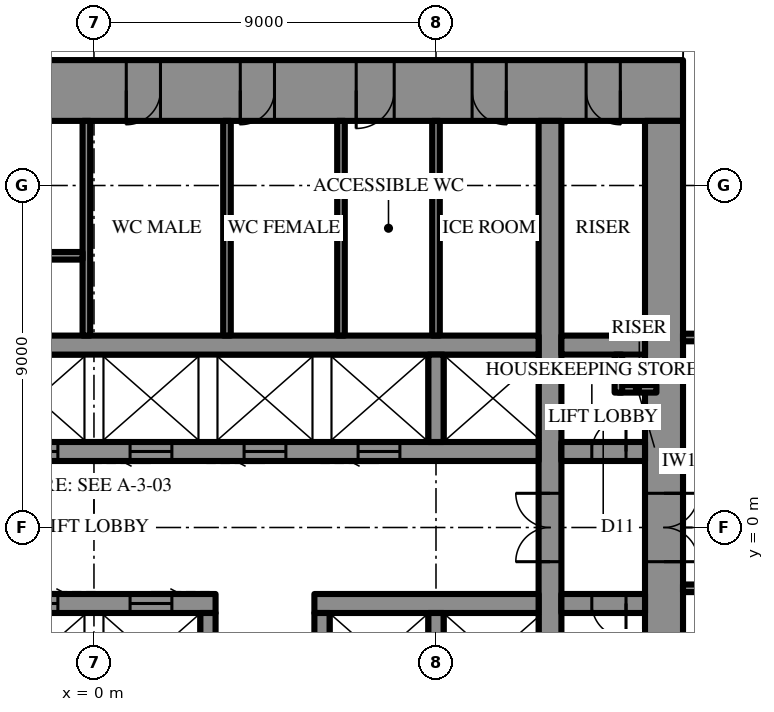
"""IFC4 building model, lengths in metres.
Left out: names, types, materials, properties, quantities, classifications, styles, units other than length and angle.
Written with IfcOpenShell. Run it as: python <this file> out.ifc"""

import sys

from ifc_helpers import new_model, si_unit, direction, frame, frame_2d, origin, place, context, subcontext, project, spatial, rectangle, extrude, element, fill, save


model = new_model("IFC4")
c1 = context("Model", 3, precision=1e-05, world=origin(), true_north=direction((0.0, 1.0)))
c2 = subcontext(c1, "Body", "Model", "MODEL_VIEW")
j1 = project(units=[si_unit("LENGTHUNIT", "METRE"), si_unit("PLANEANGLEUNIT", "RADIAN")], contexts=[c1])
p1 = place(None, origin())
s1 = spatial("IfcSite", under=j1, at=p1, CompositionType="ELEMENT")
p2 = place(p1, origin())
s2 = spatial("IfcBuilding", under=s1, at=p2, CompositionType="ELEMENT")
p3 = place(p2, frame((0.0, 0.0, 270.1)))
s3 = spatial("IfcBuildingStorey", under=s2, at=p3, CompositionType="ELEMENT", Elevation=270.1)
p4 = place(p3, frame((-15.5, 11.5, 0.0), z_axis=(0.0, 0.0, 1.0), x_axis=(1.0, 0.0, 0.0)))
e1 = element("IfcWall", 1, at=p4, inside=s3, PredefinedType="SHEAR", context=c2, shape_type="SweptSolid", body=[
    extrude(rectangle(XDim=31.0, YDim=1.6, at=frame_2d((15.5, 0.0))), origin(), (0.0, 0.0, 1.0), 4.2),
])
p5 = place(p4, frame((16.35, 0.0, 0.0)))
e2 = element("IfcOpeningElement", 2, at=p5, cuts=e1, PredefinedType="OPENING", context=c2, shape_type="SweptSolid", body=[
    extrude(rectangle(XDim=0.9, YDim=2.2, at=frame_2d((0.45, 1.1))), frame((0.0, 0.81, 0.0), z_axis=(0.0, -1.0, 0.0), x_axis=(1.0, 0.0, 0.0)), (0.0, 0.0, 1.0), 1.62),
])
p6 = place(p4, frame((19.35, 0.0, 0.0)))
e3 = element("IfcOpeningElement", 3, at=p6, cuts=e1, PredefinedType="OPENING", context=c2, shape_type="SweptSolid", body=[
    extrude(rectangle(XDim=0.9, YDim=2.2, at=frame_2d((0.45, 1.1))), frame((0.0, 0.81, 0.0), z_axis=(0.0, -1.0, 0.0), x_axis=(1.0, 0.0, 0.0)), (0.0, 0.0, 1.0), 1.62),
])
p7 = place(p4, frame((22.4, 0.0, 0.0)))
e4 = element("IfcOpeningElement", 4, at=p7, cuts=e1, PredefinedType="OPENING", context=c2, shape_type="SweptSolid", body=[
    extrude(rectangle(XDim=1.0, YDim=2.2, at=frame_2d((0.5, 1.1))), frame((0.0, 0.81, 0.0), z_axis=(0.0, -1.0, 0.0), x_axis=(1.0, 0.0, 0.0)), (0.0, 0.0, 1.0), 1.62),
])
p8 = place(p4, frame((1.65, 0.0, 0.0)))
e5 = element("IfcOpeningElement", 5, at=p8, cuts=e1, PredefinedType="OPENING", context=c2, shape_type="SweptSolid", body=[
    extrude(rectangle(XDim=0.9, YDim=2.2, at=frame_2d((0.45, 1.1))), frame((0.0, 0.81, 0.0), z_axis=(0.0, -1.0, 0.0), x_axis=(1.0, 0.0, 0.0)), (0.0, 0.0, 1.0), 1.62),
])
p9 = place(p4, frame((4.65, 0.0, 0.0)))
e6 = element("IfcOpeningElement", 6, at=p9, cuts=e1, PredefinedType="OPENING", context=c2, shape_type="SweptSolid", body=[
    extrude(rectangle(XDim=0.9, YDim=2.2, at=frame_2d((0.45, 1.1))), frame((0.0, 0.81, 0.0), z_axis=(0.0, -1.0, 0.0), x_axis=(1.0, 0.0, 0.0)), (0.0, 0.0, 1.0), 1.62),
])
p10 = place(p4, frame((25.45, 0.0, 0.0)))
e7 = element("IfcOpeningElement", 7, at=p10, cuts=e1, PredefinedType="OPENING", context=c2, shape_type="SweptSolid", body=[
    extrude(rectangle(XDim=0.9, YDim=2.2, at=frame_2d((0.45, 1.1))), frame((0.0, 0.81, 0.0), z_axis=(0.0, -1.0, 0.0), x_axis=(1.0, 0.0, 0.0)), (0.0, 0.0, 1.0), 1.62),
])
p11 = place(p4, frame((28.45, 0.0, 0.0)))
e8 = element("IfcOpeningElement", 8, at=p11, cuts=e1, PredefinedType="OPENING", context=c2, shape_type="SweptSolid", body=[
    extrude(rectangle(XDim=0.9, YDim=2.2, at=frame_2d((0.45, 1.1))), frame((0.0, 0.81, 0.0), z_axis=(0.0, -1.0, 0.0), x_axis=(1.0, 0.0, 0.0)), (0.0, 0.0, 1.0), 1.62),
])
p12 = place(p3, frame((15.0, -10.7, 0.0), z_axis=(0.0, 0.0, 1.0), x_axis=(0.0, 1.0, 0.0)))
e9 = element("IfcWall", 9, at=p12, inside=s3, PredefinedType="SHEAR", context=c2, shape_type="SweptSolid", body=[
    extrude(rectangle(XDim=21.4, YDim=1.0, at=frame_2d((10.7, 0.0))), origin(), (0.0, 0.0, 1.0), 4.2),
])
p13 = place(p12, frame((9.8, 0.0, 0.0)))
e10 = element("IfcOpeningElement", 10, at=p13, cuts=e9, PredefinedType="OPENING", context=c2, shape_type="SweptSolid", body=[
    extrude(rectangle(XDim=1.8, YDim=2.4, at=frame_2d((0.9, 1.2))), frame((0.0, 0.51, 0.0), z_axis=(0.0, -1.0, 0.0), x_axis=(1.0, 0.0, 0.0)), (0.0, 0.0, 1.0), 1.02),
])
p14 = place(p3, frame((12.0, -10.7, 0.0), z_axis=(0.0, 0.0, 1.0), x_axis=(0.0, 1.0, 0.0)))
e11 = element("IfcWall", 11, at=p14, inside=s3, PredefinedType="SHEAR", context=c2, shape_type="SweptSolid", body=[
    extrude(rectangle(XDim=21.4, YDim=0.6, at=frame_2d((10.7, 0.0))), origin(), (0.0, 0.0, 1.0), 4.2),
])
p15 = place(p14, frame((9.8, 0.0, 0.0)))
e12 = element("IfcOpeningElement", 12, at=p15, cuts=e11, PredefinedType="OPENING", context=c2, shape_type="SweptSolid", body=[
    extrude(rectangle(XDim=1.8, YDim=2.4, at=frame_2d((0.9, 1.2))), frame((0.0, 0.31, 0.0), z_axis=(0.0, -1.0, 0.0), x_axis=(1.0, 0.0, 0.0)), (0.0, 0.0, 1.0), 0.62),
])
p16 = place(p3, frame((-3.2, 2.0, 0.0), z_axis=(0.0, 0.0, 1.0), x_axis=(1.0, 0.0, 0.0)))
e13 = element("IfcWall", 13, at=p16, inside=s3, PredefinedType="SHEAR", context=c2, shape_type="SweptSolid", body=[
    extrude(rectangle(XDim=14.9, YDim=0.5, at=frame_2d((7.45, 0.0))), origin(), (0.0, 0.0, 1.0), 4.2),
])
p17 = place(p16, frame((1.15, 0.0, 0.0)))
e14 = element("IfcOpeningElement", 14, at=p17, cuts=e13, PredefinedType="OPENING", context=c2, shape_type="SweptSolid", body=[
    extrude(rectangle(XDim=1.1, YDim=2.2, at=frame_2d((0.55, 1.1))), frame((0.0, 0.26, 0.0), z_axis=(0.0, -1.0, 0.0), x_axis=(1.0, 0.0, 0.0)), (0.0, 0.0, 1.0), 0.52),
])
p18 = place(p16, frame((4.15, 0.0, 0.0)))
e15 = element("IfcOpeningElement", 15, at=p18, cuts=e13, PredefinedType="OPENING", context=c2, shape_type="SweptSolid", body=[
    extrude(rectangle(XDim=1.1, YDim=2.2, at=frame_2d((0.55, 1.1))), frame((0.0, 0.26, 0.0), z_axis=(0.0, -1.0, 0.0), x_axis=(1.0, 0.0, 0.0)), (0.0, 0.0, 1.0), 0.52),
])
p19 = place(p16, frame((7.15, 0.0, 0.0)))
e16 = element("IfcOpeningElement", 16, at=p19, cuts=e13, PredefinedType="OPENING", context=c2, shape_type="SweptSolid", body=[
    extrude(rectangle(XDim=1.1, YDim=2.2, at=frame_2d((0.55, 1.1))), frame((0.0, 0.26, 0.0), z_axis=(0.0, -1.0, 0.0), x_axis=(1.0, 0.0, 0.0)), (0.0, 0.0, 1.0), 0.52),
])
p20 = place(p16, frame((10.15, 0.0, 0.0)))
e17 = element("IfcOpeningElement", 17, at=p20, cuts=e13, PredefinedType="OPENING", context=c2, shape_type="SweptSolid", body=[
    extrude(rectangle(XDim=1.1, YDim=2.2, at=frame_2d((0.55, 1.1))), frame((0.0, 0.26, 0.0), z_axis=(0.0, -1.0, 0.0), x_axis=(1.0, 0.0, 0.0)), (0.0, 0.0, 1.0), 0.52),
])
p21 = place(p3, frame((12.3, 2.0, 0.0), z_axis=(0.0, 0.0, 1.0), x_axis=(1.0, 0.0, 0.0)))
e18 = element("IfcWall", 18, at=p21, inside=s3, PredefinedType="SHEAR", context=c2, shape_type="SweptSolid", body=[
    extrude(rectangle(XDim=2.2, YDim=0.5, at=frame_2d((1.1, 0.0))), origin(), (0.0, 0.0, 1.0), 4.2),
])
p22 = place(p21, frame((0.8, 0.0, 0.0)))
e19 = element("IfcOpeningElement", 19, at=p22, cuts=e18, PredefinedType="OPENING", context=c2, shape_type="SweptSolid", body=[
    extrude(rectangle(XDim=0.9, YDim=2.2, at=frame_2d((0.45, 1.1))), frame((0.0, 0.26, 0.0), z_axis=(0.0, -1.0, 0.0), x_axis=(1.0, 0.0, 0.0)), (0.0, 0.0, 1.0), 0.52),
])
p23 = place(p3, frame((-11.7, 4.8, 0.0), z_axis=(0.0, 0.0, 1.0), x_axis=(1.0, 0.0, 0.0)))
e20 = element("IfcWall", 20, at=p23, inside=s3, PredefinedType="SHEAR", context=c2, shape_type="SweptSolid", body=[
    extrude(rectangle(XDim=23.4, YDim=0.5, at=frame_2d((11.7, 0.0))), origin(), (0.0, 0.0, 1.0), 4.2),
])
p24 = place(p23, frame((6.6, 0.0, 0.0)))
e21 = element("IfcOpeningElement", 21, at=p24, cuts=e20, PredefinedType="OPENING", context=c2, shape_type="SweptSolid", body=[
    extrude(rectangle(XDim=1.2, YDim=2.2, at=frame_2d((0.6, 1.1))), frame((0.0, 0.26, 0.0), z_axis=(0.0, -1.0, 0.0), x_axis=(1.0, 0.0, 0.0)), (0.0, 0.0, 1.0), 0.52),
])
p25 = place(p23, frame((3.6, 0.0, 0.0)))
e22 = element("IfcOpeningElement", 22, at=p25, cuts=e20, PredefinedType="OPENING", context=c2, shape_type="SweptSolid", body=[
    extrude(rectangle(XDim=1.2, YDim=2.2, at=frame_2d((0.6, 1.1))), frame((0.0, 0.26, 0.0), z_axis=(0.0, -1.0, 0.0), x_axis=(1.0, 0.0, 0.0)), (0.0, 0.0, 1.0), 0.52),
])
p26 = place(p3, frame((12.3, 4.8, 0.0), z_axis=(0.0, 0.0, 1.0), x_axis=(1.0, 0.0, 0.0)))
e23 = element("IfcWall", 23, at=p26, inside=s3, PredefinedType="SHEAR", context=c2, shape_type="SweptSolid", body=[
    extrude(rectangle(XDim=2.2, YDim=0.5, at=frame_2d((1.1, 0.0))), origin(), (0.0, 0.0, 1.0), 4.2),
])
p27 = place(p3, frame((9.0, 2.25, 0.0), z_axis=(0.0, 0.0, 1.0), x_axis=(0.0, 1.0, 0.0)))
e24 = element("IfcWall", 24, at=p27, inside=s3, PredefinedType="SHEAR", context=c2, shape_type="SweptSolid", body=[
    extrude(rectangle(XDim=2.3, YDim=0.4, at=frame_2d((1.15, 0.0))), origin(), (0.0, 0.0, 1.0), 4.2),
])
p28 = place(p3, frame((-0.2, 5.05, 0.0), z_axis=(0.0, 0.0, 1.0), x_axis=(0.0, 1.0, 0.0)))
e25 = element("IfcWall", 25, at=p28, inside=s3, PredefinedType="SHEAR", context=c2, shape_type="SweptSolid", body=[
    extrude(rectangle(XDim=5.65, YDim=0.2, at=frame_2d((2.825, 0.0))), origin(), (0.0, 0.0, 1.0), 4.2),
])
p29 = place(p3, frame((-8.9, 7.15, 0.0), z_axis=(0.0, 0.0, 1.0), x_axis=(1.0, 0.0, 0.0)))
e26 = element("IfcWall", 26, at=p29, inside=s3, PredefinedType="SHEAR", context=c2, shape_type="SweptSolid", body=[
    extrude(rectangle(XDim=8.6, YDim=0.2, at=frame_2d((4.3, 0.0))), origin(), (0.0, 0.0, 1.0), 4.2),
])
p30 = place(p29, frame((0.3, 0.0, 0.0)))
e27 = element("IfcOpeningElement", 27, at=p30, cuts=e26, PredefinedType="OPENING", context=c2, shape_type="SweptSolid", body=[
    extrude(rectangle(XDim=1.0, YDim=2.2, at=frame_2d((0.5, 1.1))), frame((0.0, 0.11, 0.0), z_axis=(0.0, -1.0, 0.0), x_axis=(1.0, 0.0, 0.0)), (0.0, 0.0, 1.0), 0.22),
])
p31 = place(p3, frame((14.5, -2.0, 0.0), z_axis=(0.0, 0.0, 1.0), x_axis=(-1.0, 0.0, 0.0)))
e28 = element("IfcWall", 28, at=p31, inside=s3, PredefinedType="SHEAR", context=c2, shape_type="SweptSolid", body=[
    extrude(rectangle(XDim=2.2, YDim=0.5, at=frame_2d((1.1, 0.0))), origin(), (0.0, 0.0, 1.0), 4.2),
])
p32 = place(p31, frame((0.5, 0.0, 0.0)))
e29 = element("IfcOpeningElement", 29, at=p32, cuts=e28, PredefinedType="OPENING", context=c2, shape_type="SweptSolid", body=[
    extrude(rectangle(XDim=0.9, YDim=2.2, at=frame_2d((0.45, 1.1))), frame((0.0, 0.26, 0.0), z_axis=(0.0, -1.0, 0.0), x_axis=(1.0, 0.0, 0.0)), (0.0, 0.0, 1.0), 0.52),
])
p33 = place(p3, frame((11.7, -2.0, 0.0), z_axis=(0.0, 0.0, 1.0), x_axis=(-1.0, 0.0, 0.0)))
e30 = element("IfcWall", 30, at=p33, inside=s3, PredefinedType="SHEAR", context=c2, shape_type="SweptSolid", body=[
    extrude(rectangle(XDim=5.9, YDim=0.5, at=frame_2d((2.95, 0.0))), origin(), (0.0, 0.0, 1.0), 4.2),
])
p34 = place(p3, frame((3.2, -2.0, 0.0), z_axis=(0.0, 0.0, 1.0), x_axis=(-1.0, 0.0, 0.0)))
e31 = element("IfcWall", 31, at=p34, inside=s3, PredefinedType="SHEAR", context=c2, shape_type="SweptSolid", body=[
    extrude(rectangle(XDim=14.9, YDim=0.5, at=frame_2d((7.45, 0.0))), origin(), (0.0, 0.0, 1.0), 4.2),
])
p35 = place(p34, frame((1.15, 0.0, 0.0)))
e32 = element("IfcOpeningElement", 32, at=p35, cuts=e31, PredefinedType="OPENING", context=c2, shape_type="SweptSolid", body=[
    extrude(rectangle(XDim=1.1, YDim=2.2, at=frame_2d((0.55, 1.1))), frame((0.0, 0.26, 0.0), z_axis=(0.0, -1.0, 0.0), x_axis=(1.0, 0.0, 0.0)), (0.0, 0.0, 1.0), 0.52),
])
p36 = place(p34, frame((4.15, 0.0, 0.0)))
e33 = element("IfcOpeningElement", 33, at=p36, cuts=e31, PredefinedType="OPENING", context=c2, shape_type="SweptSolid", body=[
    extrude(rectangle(XDim=1.1, YDim=2.2, at=frame_2d((0.55, 1.1))), frame((0.0, 0.26, 0.0), z_axis=(0.0, -1.0, 0.0), x_axis=(1.0, 0.0, 0.0)), (0.0, 0.0, 1.0), 0.52),
])
p37 = place(p34, frame((7.15, 0.0, 0.0)))
e34 = element("IfcOpeningElement", 34, at=p37, cuts=e31, PredefinedType="OPENING", context=c2, shape_type="SweptSolid", body=[
    extrude(rectangle(XDim=1.1, YDim=2.2, at=frame_2d((0.55, 1.1))), frame((0.0, 0.26, 0.0), z_axis=(0.0, -1.0, 0.0), x_axis=(1.0, 0.0, 0.0)), (0.0, 0.0, 1.0), 0.52),
])
p38 = place(p34, frame((10.15, 0.0, 0.0)))
e35 = element("IfcOpeningElement", 35, at=p38, cuts=e31, PredefinedType="OPENING", context=c2, shape_type="SweptSolid", body=[
    extrude(rectangle(XDim=1.1, YDim=2.2, at=frame_2d((0.55, 1.1))), frame((0.0, 0.26, 0.0), z_axis=(0.0, -1.0, 0.0), x_axis=(1.0, 0.0, 0.0)), (0.0, 0.0, 1.0), 0.52),
])
for number, where, z_axis, x_axis in (
    (36, (9.0, -2.25, 0.0), (0.0, 0.0, 1.0), (0.0, -1.0, 0.0)),
    (37, (6.0, -2.25, 0.0), (0.0, 0.0, 1.0), (0.0, -1.0, 0.0)),
    (38, (3.0, -2.25, 0.0), (0.0, 0.0, 1.0), (0.0, -1.0, 0.0)),
):
    element("IfcWall", number, at=place(p3, frame(where, z_axis=z_axis, x_axis=x_axis)), inside=s3, PredefinedType="SHEAR", context=c2, shape_type="SweptSolid", body=[
        extrude(rectangle(XDim=2.3, YDim=0.4, at=frame_2d((1.15, 0.0))), origin(), (0.0, 0.0, 1.0), 4.2),
    ])
for number, where, z_axis, x_axis in (
    (39, (9.0, 5.05, 0.0), (0.0, 0.0, 1.0), (0.0, 1.0, 0.0)),
    (40, (3.5, 5.05, 0.0), (0.0, 0.0, 1.0), (0.0, 1.0, 0.0)),
    (41, (6.5, 5.05, 0.0), (0.0, 0.0, 1.0), (0.0, 1.0, 0.0)),
):
    element("IfcWall", number, at=place(p3, frame(where, z_axis=z_axis, x_axis=x_axis)), inside=s3, PredefinedType="PARTITIONING", context=c2, shape_type="SweptSolid", body=[
        extrude(rectangle(XDim=5.65, YDim=0.2, at=frame_2d((2.825, 0.0))), origin(), (0.0, 0.0, 1.0), 4.0),
    ])
for number, where, z_axis, x_axis in (
    (42, (13.8, 3.65, 0.0), (0.0, 0.0, 1.0), (1.0, 0.0, 0.0)),
    (43, (13.8, 3.55, 0.0), (0.0, 0.0, 1.0), (0.0, 1.0, 0.0)),
):
    element("IfcWall", number, at=place(p3, frame(where, z_axis=z_axis, x_axis=x_axis)), inside=s3, PredefinedType="PARTITIONING", context=c2, shape_type="SweptSolid", body=[
        extrude(rectangle(XDim=1.0, YDim=0.2, at=frame_2d((0.5, 0.0))), origin(), (0.0, 0.0, 1.0), 4.0),
    ])
p39 = place(p3, frame((15.5, 1.6, 0.0), z_axis=(0.0, 0.0, 1.0), x_axis=(1.0, 0.0, 0.0)))
e44 = element("IfcWall", 44, at=p39, inside=s3, PredefinedType="PARTITIONING", context=c2, shape_type="SweptSolid", body=[
    extrude(rectangle(XDim=10.7, YDim=0.2, at=frame_2d((5.35, 0.0))), origin(), (0.0, 0.0, 1.0), 4.0),
])
p40 = place(p39, frame((2.71, 0.0, 0.0)))
e45 = element("IfcOpeningElement", 45, at=p40, cuts=e44, PredefinedType="OPENING", context=c2, shape_type="SweptSolid", body=[
    extrude(rectangle(XDim=1.0, YDim=2.2, at=frame_2d((0.5, 1.1))), frame((0.0, 0.11, 0.0), z_axis=(0.0, -1.0, 0.0), x_axis=(1.0, 0.0, 0.0)), (0.0, 0.0, 1.0), 0.22),
])
p41 = place(p3, frame((15.5, -1.6, 0.0), z_axis=(0.0, 0.0, 1.0), x_axis=(1.0, 0.0, 0.0)))
e46 = element("IfcWall", 46, at=p41, inside=s3, PredefinedType="PARTITIONING", context=c2, shape_type="SweptSolid", body=[
    extrude(rectangle(XDim=2.3, YDim=0.2, at=frame_2d((1.15, 0.0))), origin(), (0.0, 0.0, 1.0), 4.0),
])
p42 = place(p3, frame((15.5, 5.0, 0.0), z_axis=(0.0, 0.0, 1.0), x_axis=(1.0, 0.0, 0.0)))
e47 = element("IfcWall", 47, at=p42, inside=s3, PredefinedType="PARTITIONING", context=c2, shape_type="SweptSolid", body=[
    extrude(rectangle(XDim=14.845, YDim=0.2, at=frame_2d((7.423, 0.0))), origin(), (0.0, 0.0, 1.0), 4.0),
])
p43 = place(p42, frame((0.985, 0.0, 0.0)))
e48 = element("IfcOpeningElement", 48, at=p43, cuts=e47, PredefinedType="OPENING", context=c2, shape_type="SweptSolid", body=[
    extrude(rectangle(XDim=1.0, YDim=2.2, at=frame_2d((0.5, 1.1))), frame((0.0, 0.11, 0.0), z_axis=(0.0, -1.0, 0.0), x_axis=(1.0, 0.0, 0.0)), (0.0, 0.0, 1.0), 0.22),
])
p44 = place(p13, frame((1.8, 0.0, 0.0), z_axis=(0.0, 0.0, 1.0), x_axis=(-1.0, 0.0, 0.0)))
e49 = element("IfcDoor", 49, at=p44, inside=s3, OperationType="DOUBLE_DOOR_SINGLE_SWING", PredefinedType="DOOR", context=c2, shape_type="SweptSolid", body=[
    extrude(rectangle(XDim=1.8, YDim=2.4, at=frame_2d((0.9, 1.2))), frame((0.0, 0.025, 0.0), z_axis=(0.0, -1.0, 0.0), x_axis=(1.0, 0.0, 0.0)), (0.0, 0.0, 1.0), 0.05),
])
fill(e10, e49)
p45 = place(p5, frame((0.9, 0.0, 0.0), z_axis=(0.0, 0.0, 1.0), x_axis=(-1.0, 0.0, 0.0)))
e50 = element("IfcDoor", 50, at=p45, inside=s3, OperationType="SINGLE_SWING_LEFT", PredefinedType="DOOR", context=c2, shape_type="SweptSolid", body=[
    extrude(rectangle(XDim=0.9, YDim=2.2, at=frame_2d((0.45, 1.1))), frame((0.0, 0.025, 0.0), z_axis=(0.0, -1.0, 0.0), x_axis=(1.0, 0.0, 0.0)), (0.0, 0.0, 1.0), 0.05),
])
fill(e2, e50)
p46 = place(p6, frame((0.9, 0.0, 0.0), z_axis=(0.0, 0.0, 1.0), x_axis=(-1.0, 0.0, 0.0)))
e51 = element("IfcDoor", 51, at=p46, inside=s3, OperationType="SINGLE_SWING_LEFT", PredefinedType="DOOR", context=c2, shape_type="SweptSolid", body=[
    extrude(rectangle(XDim=0.9, YDim=2.2, at=frame_2d((0.45, 1.1))), frame((0.0, 0.025, 0.0), z_axis=(0.0, -1.0, 0.0), x_axis=(1.0, 0.0, 0.0)), (0.0, 0.0, 1.0), 0.05),
])
fill(e3, e51)
p47 = place(p7, frame((1.0, 0.0, 0.0), z_axis=(0.0, 0.0, 1.0), x_axis=(-1.0, 0.0, 0.0)))
e52 = element("IfcDoor", 52, at=p47, inside=s3, OperationType="SINGLE_SWING_LEFT", PredefinedType="DOOR", context=c2, shape_type="SweptSolid", body=[
    extrude(rectangle(XDim=1.0, YDim=2.2, at=frame_2d((0.5, 1.1))), frame((0.0, 0.025, 0.0), z_axis=(0.0, -1.0, 0.0), x_axis=(1.0, 0.0, 0.0)), (0.0, 0.0, 1.0), 0.05),
])
fill(e4, e52)
p48 = place(p10, frame((0.9, 0.0, 0.0), z_axis=(0.0, 0.0, 1.0), x_axis=(-1.0, 0.0, 0.0)))
e53 = element("IfcDoor", 53, at=p48, inside=s3, OperationType="SINGLE_SWING_RIGHT", PredefinedType="DOOR", context=c2, shape_type="SweptSolid", body=[
    extrude(rectangle(XDim=0.9, YDim=2.2, at=frame_2d((0.45, 1.1))), frame((0.0, 0.025, 0.0), z_axis=(0.0, -1.0, 0.0), x_axis=(1.0, 0.0, 0.0)), (0.0, 0.0, 1.0), 0.05),
])
fill(e7, e53)
p49 = place(p11, frame((0.9, 0.0, 0.0), z_axis=(0.0, 0.0, 1.0), x_axis=(-1.0, 0.0, 0.0)))
e54 = element("IfcDoor", 54, at=p49, inside=s3, OperationType="SINGLE_SWING_RIGHT", PredefinedType="DOOR", context=c2, shape_type="SweptSolid", body=[
    extrude(rectangle(XDim=0.9, YDim=2.2, at=frame_2d((0.45, 1.1))), frame((0.0, 0.025, 0.0), z_axis=(0.0, -1.0, 0.0), x_axis=(1.0, 0.0, 0.0)), (0.0, 0.0, 1.0), 0.05),
])
fill(e8, e54)
p50 = place(p22, origin())
e55 = element("IfcDoor", 55, at=p50, inside=s3, OperationType="SINGLE_SWING_LEFT", PredefinedType="DOOR", context=c2, shape_type="SweptSolid", body=[
    extrude(rectangle(XDim=0.9, YDim=2.2, at=frame_2d((0.45, 1.1))), frame((0.0, 0.025, 0.0), z_axis=(0.0, -1.0, 0.0), x_axis=(1.0, 0.0, 0.0)), (0.0, 0.0, 1.0), 0.05),
])
fill(e19, e55)
p51 = place(p32, origin())
e56 = element("IfcDoor", 56, at=p51, inside=s3, OperationType="SINGLE_SWING_RIGHT", PredefinedType="DOOR", context=c2, shape_type="SweptSolid", body=[
    extrude(rectangle(XDim=0.9, YDim=2.2, at=frame_2d((0.45, 1.1))), frame((0.0, 0.025, 0.0), z_axis=(0.0, -1.0, 0.0), x_axis=(1.0, 0.0, 0.0)), (0.0, 0.0, 1.0), 0.05),
])
fill(e29, e56)
p52 = place(p15, origin())
e57 = element("IfcDoor", 57, at=p52, inside=s3, OperationType="DOUBLE_DOOR_SINGLE_SWING", PredefinedType="DOOR", context=c2, shape_type="SweptSolid", body=[
    extrude(rectangle(XDim=1.8, YDim=2.4, at=frame_2d((0.9, 1.2))), frame((0.0, 0.025, 0.0), z_axis=(0.0, -1.0, 0.0), x_axis=(1.0, 0.0, 0.0)), (0.0, 0.0, 1.0), 0.05),
])
fill(e12, e57)
p53 = place(p17, frame((1.1, 0.0, 0.0), z_axis=(0.0, 0.0, 1.0), x_axis=(-1.0, 0.0, 0.0)))
e58 = element("IfcDoor", 58, at=p53, inside=s3, OperationType="SLIDING_TO_LEFT", PredefinedType="DOOR", context=c2, shape_type="SweptSolid", body=[
    extrude(rectangle(XDim=1.1, YDim=2.2, at=frame_2d((0.55, 1.1))), frame((0.0, 0.025, 0.0), z_axis=(0.0, -1.0, 0.0), x_axis=(1.0, 0.0, 0.0)), (0.0, 0.0, 1.0), 0.05),
])
fill(e14, e58)
p54 = place(p18, frame((1.1, 0.0, 0.0), z_axis=(0.0, 0.0, 1.0), x_axis=(-1.0, 0.0, 0.0)))
e59 = element("IfcDoor", 59, at=p54, inside=s3, OperationType="SLIDING_TO_LEFT", PredefinedType="DOOR", context=c2, shape_type="SweptSolid", body=[
    extrude(rectangle(XDim=1.1, YDim=2.2, at=frame_2d((0.55, 1.1))), frame((0.0, 0.025, 0.0), z_axis=(0.0, -1.0, 0.0), x_axis=(1.0, 0.0, 0.0)), (0.0, 0.0, 1.0), 0.05),
])
fill(e15, e59)
p55 = place(p19, frame((1.1, 0.0, 0.0), z_axis=(0.0, 0.0, 1.0), x_axis=(-1.0, 0.0, 0.0)))
e60 = element("IfcDoor", 60, at=p55, inside=s3, OperationType="SLIDING_TO_LEFT", PredefinedType="DOOR", context=c2, shape_type="SweptSolid", body=[
    extrude(rectangle(XDim=1.1, YDim=2.2, at=frame_2d((0.55, 1.1))), frame((0.0, 0.025, 0.0), z_axis=(0.0, -1.0, 0.0), x_axis=(1.0, 0.0, 0.0)), (0.0, 0.0, 1.0), 0.05),
])
fill(e16, e60)
p56 = place(p20, frame((1.1, 0.0, 0.0), z_axis=(0.0, 0.0, 1.0), x_axis=(-1.0, 0.0, 0.0)))
e61 = element("IfcDoor", 61, at=p56, inside=s3, OperationType="SLIDING_TO_LEFT", PredefinedType="DOOR", context=c2, shape_type="SweptSolid", body=[
    extrude(rectangle(XDim=1.1, YDim=2.2, at=frame_2d((0.55, 1.1))), frame((0.0, 0.025, 0.0), z_axis=(0.0, -1.0, 0.0), x_axis=(1.0, 0.0, 0.0)), (0.0, 0.0, 1.0), 0.05),
])
fill(e17, e61)
p57 = place(p35, frame((1.1, 0.0, 0.0), z_axis=(0.0, 0.0, 1.0), x_axis=(-1.0, 0.0, 0.0)))
e62 = element("IfcDoor", 62, at=p57, inside=s3, OperationType="SLIDING_TO_LEFT", PredefinedType="DOOR", context=c2, shape_type="SweptSolid", body=[
    extrude(rectangle(XDim=1.1, YDim=2.2, at=frame_2d((0.55, 1.1))), frame((0.0, 0.025, 0.0), z_axis=(0.0, -1.0, 0.0), x_axis=(1.0, 0.0, 0.0)), (0.0, 0.0, 1.0), 0.05),
])
fill(e32, e62)
p58 = place(p36, frame((1.1, 0.0, 0.0), z_axis=(0.0, 0.0, 1.0), x_axis=(-1.0, 0.0, 0.0)))
e63 = element("IfcDoor", 63, at=p58, inside=s3, OperationType="SLIDING_TO_LEFT", PredefinedType="DOOR", context=c2, shape_type="SweptSolid", body=[
    extrude(rectangle(XDim=1.1, YDim=2.2, at=frame_2d((0.55, 1.1))), frame((0.0, 0.025, 0.0), z_axis=(0.0, -1.0, 0.0), x_axis=(1.0, 0.0, 0.0)), (0.0, 0.0, 1.0), 0.05),
])
fill(e33, e63)
save(model, sys.argv[1])
